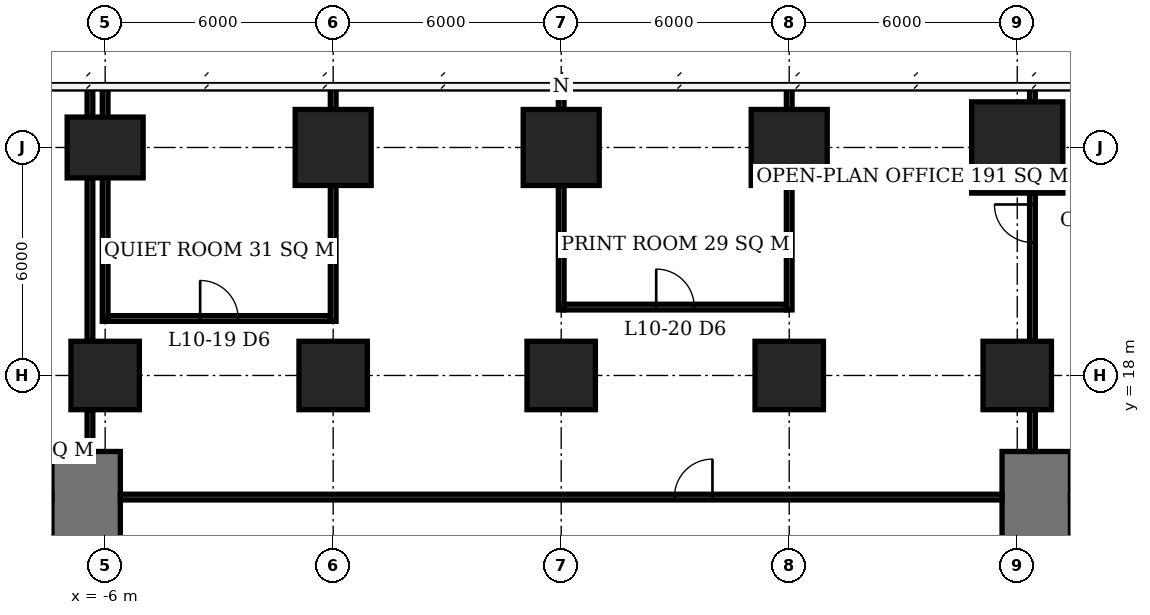
"""IFC4 building model, lengths in metres.
Left out: names, types, materials, properties, quantities, classifications, styles, units other than length and angle.
Written with IfcOpenShell. Run it as: python <this file> out.ifc"""

import sys

from ifc_helpers import new_model, si_unit, direction, frame, frame_2d, origin, origin_2d, place, context, subcontext, project, spatial, rectangle, extrude, element, fill, save


model = new_model("IFC4")
c1 = context("Model", 3, precision=1e-05, world=origin(), true_north=direction((0.0, 1.0)))
c2 = subcontext(c1, "Body", "Model", "MODEL_VIEW")
j1 = project(units=[si_unit("LENGTHUNIT", "METRE"), si_unit("PLANEANGLEUNIT", "RADIAN")], contexts=[c1])
p1 = place(None, origin())
s1 = spatial("IfcSite", under=j1, at=p1, CompositionType="ELEMENT")
p2 = place(p1, origin())
s2 = spatial("IfcBuilding", under=s1, at=p2, CompositionType="ELEMENT")
p3 = place(p2, frame((0.0, 0.0, 45.5)))
s3 = spatial("IfcBuildingStorey", under=s2, at=p3, CompositionType="ELEMENT", Elevation=45.5)
p4 = place(p3, frame((-6.0, 18.0, 0.0), z_axis=(0.0, 0.0, 1.0), x_axis=(1.0, 0.0, 0.0)))
e1 = element("IfcColumn", 1, at=p4, inside=s3, PredefinedType="COLUMN", context=c2, shape_type="SweptSolid", body=[
    extrude(rectangle(XDim=1.8, YDim=1.8, at=origin_2d()), origin(), (0.0, 0.0, 1.0), 3.9),
])
p5 = place(p3, frame((-6.0, 24.0, 0.0), z_axis=(0.0, 0.0, 1.0), x_axis=(1.0, 0.0, 0.0)))
e2 = element("IfcColumn", 2, at=p5, inside=s3, PredefinedType="COLUMN", context=c2, shape_type="SweptSolid", body=[
    extrude(rectangle(XDim=2.0, YDim=1.6, at=origin_2d()), origin(), (0.0, 0.0, 1.0), 3.9),
])
p6 = place(p3, frame((0.0, 18.0, 0.0), z_axis=(0.0, 0.0, 1.0), x_axis=(1.0, 0.0, 0.0)))
e3 = element("IfcColumn", 3, at=p6, inside=s3, PredefinedType="COLUMN", context=c2, shape_type="SweptSolid", body=[
    extrude(rectangle(XDim=1.8, YDim=1.8, at=origin_2d()), origin(), (0.0, 0.0, 1.0), 3.9),
])
p7 = place(p3, frame((0.0, 24.0, 0.0), z_axis=(0.0, 0.0, 1.0), x_axis=(1.0, 0.0, 0.0)))
e4 = element("IfcColumn", 4, at=p7, inside=s3, PredefinedType="COLUMN", context=c2, shape_type="SweptSolid", body=[
    extrude(rectangle(XDim=2.0, YDim=2.0, at=origin_2d()), origin(), (0.0, 0.0, 1.0), 3.9),
])
p8 = place(p3, frame((6.0, 18.0, 0.0), z_axis=(0.0, 0.0, 1.0), x_axis=(1.0, 0.0, 0.0)))
e5 = element("IfcColumn", 5, at=p8, inside=s3, PredefinedType="COLUMN", context=c2, shape_type="SweptSolid", body=[
    extrude(rectangle(XDim=1.8, YDim=1.8, at=origin_2d()), origin(), (0.0, 0.0, 1.0), 3.9),
])
p9 = place(p3, frame((6.0, 24.0, 0.0), z_axis=(0.0, 0.0, 1.0), x_axis=(1.0, 0.0, 0.0)))
e6 = element("IfcColumn", 6, at=p9, inside=s3, PredefinedType="COLUMN", context=c2, shape_type="SweptSolid", body=[
    extrude(rectangle(XDim=2.0, YDim=2.0, at=origin_2d()), origin(), (0.0, 0.0, 1.0), 3.9),
])
p10 = place(p3, frame((12.0, 18.0, 0.0), z_axis=(0.0, 0.0, 1.0), x_axis=(1.0, 0.0, 0.0)))
e7 = element("IfcColumn", 7, at=p10, inside=s3, PredefinedType="COLUMN", context=c2, shape_type="SweptSolid", body=[
    extrude(rectangle(XDim=1.8, YDim=1.8, at=origin_2d()), origin(), (0.0, 0.0, 1.0), 3.9),
])
p11 = place(p3, frame((12.0, 24.0, 0.0), z_axis=(0.0, 0.0, 1.0), x_axis=(1.0, 0.0, 0.0)))
e8 = element("IfcColumn", 8, at=p11, inside=s3, PredefinedType="COLUMN", context=c2, shape_type="SweptSolid", body=[
    extrude(rectangle(XDim=2.0, YDim=2.0, at=origin_2d()), origin(), (0.0, 0.0, 1.0), 3.9),
])
p12 = place(p3, frame((18.0, 18.0, 0.0), z_axis=(0.0, 0.0, 1.0), x_axis=(1.0, 0.0, 0.0)))
e9 = element("IfcColumn", 9, at=p12, inside=s3, PredefinedType="COLUMN", context=c2, shape_type="SweptSolid", body=[
    extrude(rectangle(XDim=1.8, YDim=1.8, at=origin_2d()), origin(), (0.0, 0.0, 1.0), 3.9),
])
p13 = place(p3, frame((18.0, 24.0, 0.0), z_axis=(0.0, 0.0, 1.0), x_axis=(1.0, 0.0, 0.0)))
e10 = element("IfcColumn", 10, at=p13, inside=s3, PredefinedType="COLUMN", context=c2, shape_type="SweptSolid", body=[
    extrude(rectangle(XDim=2.4, YDim=2.4, at=origin_2d()), origin(), (0.0, 0.0, 1.0), 3.9),
])
for number, where, z_axis, x_axis in (
    (11, (-6.5, 13.6, 0.0), (0.0, 0.0, 1.0), (0.0, 1.0, 0.0)),
    (12, (18.5, 13.6, 0.0), (0.0, 0.0, 1.0), (0.0, 1.0, 0.0)),
):
    element("IfcWall", number, at=place(p3, frame(where, z_axis=z_axis, x_axis=x_axis)), inside=s3, PredefinedType="SHEAR", context=c2, shape_type="SweptSolid", body=[
        extrude(rectangle(XDim=2.4, YDim=1.8, at=frame_2d((1.2, 0.0))), origin(), (0.0, 0.0, 1.0), 3.9),
    ])
p14 = place(p3, frame((-5.925, 19.5, 0.0), z_axis=(0.0, 0.0, 1.0), x_axis=(1.0, 0.0, 0.0)))
e13 = element("IfcWall", 13, at=p14, inside=s3, PredefinedType="PARTITIONING", context=c2, shape_type="SweptSolid", body=[
    extrude(rectangle(XDim=5.85, YDim=0.15, at=frame_2d((2.925, 0.0))), origin(), (0.0, 0.0, 1.0), 3.65),
])
p15 = place(p14, frame((2.425, 0.0, 0.0)))
e14 = element("IfcOpeningElement", 14, at=p15, cuts=e13, PredefinedType="OPENING", context=c2, shape_type="SweptSolid", body=[
    extrude(rectangle(XDim=1.0, YDim=2.1, at=frame_2d((0.5, 1.05))), frame((0.0, 0.085, 0.0), z_axis=(0.0, -1.0, 0.0), x_axis=(1.0, 0.0, 0.0)), (0.0, 0.0, 1.0), 0.17),
])
p16 = place(p3, frame((6.075, 19.8, 0.0), z_axis=(0.0, 0.0, 1.0), x_axis=(1.0, 0.0, 0.0)))
e15 = element("IfcWall", 15, at=p16, inside=s3, PredefinedType="PARTITIONING", context=c2, shape_type="SweptSolid", body=[
    extrude(rectangle(XDim=5.85, YDim=0.15, at=frame_2d((2.925, 0.0))), origin(), (0.0, 0.0, 1.0), 3.65),
])
p17 = place(p16, frame((2.425, 0.0, 0.0)))
e16 = element("IfcOpeningElement", 16, at=p17, cuts=e15, PredefinedType="OPENING", context=c2, shape_type="SweptSolid", body=[
    extrude(rectangle(XDim=1.0, YDim=2.1, at=frame_2d((0.5, 1.05))), frame((0.0, 0.085, 0.0), z_axis=(0.0, -1.0, 0.0), x_axis=(1.0, 0.0, 0.0)), (0.0, 0.0, 1.0), 0.17),
])
p18 = place(p3, frame((-6.0, 19.425, 0.0), z_axis=(0.0, 0.0, 1.0), x_axis=(0.0, 1.0, 0.0)))
e17 = element("IfcWall", 17, at=p18, inside=s3, PredefinedType="PARTITIONING", context=c2, shape_type="SweptSolid", body=[
    extrude(rectangle(XDim=3.775, YDim=0.15, at=frame_2d((1.887, 0.0))), origin(), (0.0, 0.0, 1.0), 3.65),
])
p19 = place(p3, frame((-6.0, 24.8, 0.0), z_axis=(0.0, 0.0, 1.0), x_axis=(0.0, 1.0, 0.0)))
e18 = element("IfcWall", 18, at=p19, inside=s3, PredefinedType="PARTITIONING", context=c2, shape_type="SweptSolid", body=[
    extrude(rectangle(XDim=0.8, YDim=0.15, at=frame_2d((0.4, 0.0))), origin(), (0.0, 0.0, 1.0), 3.65),
])
p20 = place(p3, frame((0.0, 19.425, 0.0), z_axis=(0.0, 0.0, 1.0), x_axis=(0.0, 1.0, 0.0)))
e19 = element("IfcWall", 19, at=p20, inside=s3, PredefinedType="PARTITIONING", context=c2, shape_type="SweptSolid", body=[
    extrude(rectangle(XDim=3.575, YDim=0.15, at=frame_2d((1.788, 0.0))), origin(), (0.0, 0.0, 1.0), 3.65),
])
p21 = place(p3, frame((0.0, 25.0, 0.0), z_axis=(0.0, 0.0, 1.0), x_axis=(0.0, 1.0, 0.0)))
e20 = element("IfcWall", 20, at=p21, inside=s3, PredefinedType="PARTITIONING", context=c2, shape_type="SweptSolid", body=[
    extrude(rectangle(XDim=0.6, YDim=0.15, at=frame_2d((0.3, 0.0))), origin(), (0.0, 0.0, 1.0), 3.65),
])
p22 = place(p3, frame((6.0, 19.725, 0.0), z_axis=(0.0, 0.0, 1.0), x_axis=(0.0, 1.0, 0.0)))
e21 = element("IfcWall", 21, at=p22, inside=s3, PredefinedType="PARTITIONING", context=c2, shape_type="SweptSolid", body=[
    extrude(rectangle(XDim=3.275, YDim=0.15, at=frame_2d((1.637, 0.0))), origin(), (0.0, 0.0, 1.0), 3.65),
])
p23 = place(p3, frame((6.0, 25.0, 0.0), z_axis=(0.0, 0.0, 1.0), x_axis=(0.0, 1.0, 0.0)))
e22 = element("IfcWall", 22, at=p23, inside=s3, PredefinedType="PARTITIONING", context=c2, shape_type="SweptSolid", body=[
    extrude(rectangle(XDim=0.55, YDim=0.15, at=frame_2d((0.275, 0.0))), origin(), (0.0, 0.0, 1.0), 3.65),
])
p24 = place(p3, frame((12.0, 19.725, 0.0), z_axis=(0.0, 0.0, 1.0), x_axis=(0.0, 1.0, 0.0)))
e23 = element("IfcWall", 23, at=p24, inside=s3, PredefinedType="PARTITIONING", context=c2, shape_type="SweptSolid", body=[
    extrude(rectangle(XDim=3.275, YDim=0.15, at=frame_2d((1.637, 0.0))), origin(), (0.0, 0.0, 1.0), 3.65),
])
p25 = place(p3, frame((12.0, 25.0, 0.0), z_axis=(0.0, 0.0, 1.0), x_axis=(0.0, 1.0, 0.0)))
e24 = element("IfcWall", 24, at=p25, inside=s3, PredefinedType="PARTITIONING", context=c2, shape_type="SweptSolid", body=[
    extrude(rectangle(XDim=0.6, YDim=0.15, at=frame_2d((0.3, 0.0))), origin(), (0.0, 0.0, 1.0), 3.65),
])
p26 = place(p3, frame((-6.4, 16.0, 0.0), z_axis=(0.0, 0.0, 1.0), x_axis=(0.0, 1.0, 0.0)))
e25 = element("IfcWall", 25, at=p26, inside=s3, PredefinedType="PARTITIONING", context=c2, shape_type="SweptSolid", body=[
    extrude(rectangle(XDim=1.1, YDim=0.15, at=frame_2d((0.55, 0.0))), origin(), (0.0, 0.0, 1.0), 3.65),
])
p27 = place(p3, frame((-6.4, 18.9, 0.0), z_axis=(0.0, 0.0, 1.0), x_axis=(0.0, 1.0, 0.0)))
e26 = element("IfcWall", 26, at=p27, inside=s3, PredefinedType="PARTITIONING", context=c2, shape_type="SweptSolid", body=[
    extrude(rectangle(XDim=4.3, YDim=0.15, at=frame_2d((2.15, 0.0))), origin(), (0.0, 0.0, 1.0), 3.65),
])
p28 = place(p3, frame((-6.4, 24.8, 0.0), z_axis=(0.0, 0.0, 1.0), x_axis=(0.0, 1.0, 0.0)))
e27 = element("IfcWall", 27, at=p28, inside=s3, PredefinedType="PARTITIONING", context=c2, shape_type="SweptSolid", body=[
    extrude(rectangle(XDim=0.75, YDim=0.15, at=frame_2d((0.375, 0.0))), origin(), (0.0, 0.0, 1.0), 3.65),
])
p29 = place(p3, frame((-5.6, 14.8, 0.0), z_axis=(0.0, 0.0, 1.0), x_axis=(1.0, 0.0, 0.0)))
e28 = element("IfcWall", 28, at=p29, inside=s3, PredefinedType="PARTITIONING", context=c2, shape_type="SweptSolid", body=[
    extrude(rectangle(XDim=23.2, YDim=0.15, at=frame_2d((11.6, 0.0))), origin(), (0.0, 0.0, 1.0), 3.65),
])
p30 = place(p29, frame((14.58, 0.0, 0.0)))
e29 = element("IfcOpeningElement", 29, at=p30, cuts=e28, PredefinedType="OPENING", context=c2, shape_type="SweptSolid", body=[
    extrude(rectangle(XDim=1.0, YDim=2.1, at=frame_2d((0.5, 1.05))), frame((0.0, 0.085, 0.0), z_axis=(0.0, -1.0, 0.0), x_axis=(1.0, 0.0, 0.0)), (0.0, 0.0, 1.0), 0.17),
])
p31 = place(p3, frame((18.4, 16.0, 0.0), z_axis=(0.0, 0.0, 1.0), x_axis=(0.0, 1.0, 0.0)))
e30 = element("IfcWall", 30, at=p31, inside=s3, PredefinedType="PARTITIONING", context=c2, shape_type="SweptSolid", body=[
    extrude(rectangle(XDim=1.1, YDim=0.15, at=frame_2d((0.55, 0.0))), origin(), (0.0, 0.0, 1.0), 3.65),
])
p32 = place(p3, frame((18.4, 18.9, 0.0), z_axis=(0.0, 0.0, 1.0), x_axis=(0.0, 1.0, 0.0)))
e31 = element("IfcWall", 31, at=p32, inside=s3, PredefinedType="PARTITIONING", context=c2, shape_type="SweptSolid", body=[
    extrude(rectangle(XDim=3.9, YDim=0.15, at=frame_2d((1.95, 0.0))), origin(), (0.0, 0.0, 1.0), 3.65),
])
p33 = place(p32, frame((2.6, 0.0, 0.0)))
e32 = element("IfcOpeningElement", 32, at=p33, cuts=e31, PredefinedType="OPENING", context=c2, shape_type="SweptSolid", body=[
    extrude(rectangle(XDim=1.0, YDim=2.1, at=frame_2d((0.5, 1.05))), frame((0.0, 0.085, 0.0), z_axis=(0.0, -1.0, 0.0), x_axis=(1.0, 0.0, 0.0)), (0.0, 0.0, 1.0), 0.17),
])
p34 = place(p3, frame((18.4, 25.2, 0.0), z_axis=(0.0, 0.0, 1.0), x_axis=(0.0, 1.0, 0.0)))
e33 = element("IfcWall", 33, at=p34, inside=s3, PredefinedType="PARTITIONING", context=c2, shape_type="SweptSolid", body=[
    extrude(rectangle(XDim=0.35, YDim=0.15, at=frame_2d((0.175, 0.0))), origin(), (0.0, 0.0, 1.0), 3.65),
])
p35 = place(p15, origin())
e34 = element("IfcDoor", 34, at=p35, inside=s3, OperationType="SINGLE_SWING_LEFT", PredefinedType="DOOR", context=c2, shape_type="SweptSolid", body=[
    extrude(rectangle(XDim=1.0, YDim=2.1, at=frame_2d((0.5, 1.05))), frame((0.0, 0.025, 0.0), z_axis=(0.0, -1.0, 0.0), x_axis=(1.0, 0.0, 0.0)), (0.0, 0.0, 1.0), 0.05),
])
fill(e14, e34)
p36 = place(p17, origin())
e35 = element("IfcDoor", 35, at=p36, inside=s3, OperationType="SINGLE_SWING_LEFT", PredefinedType="DOOR", context=c2, shape_type="SweptSolid", body=[
    extrude(rectangle(XDim=1.0, YDim=2.1, at=frame_2d((0.5, 1.05))), frame((0.0, 0.025, 0.0), z_axis=(0.0, -1.0, 0.0), x_axis=(1.0, 0.0, 0.0)), (0.0, 0.0, 1.0), 0.05),
])
fill(e16, e35)
p37 = place(p30, origin())
e36 = element("IfcDoor", 36, at=p37, inside=s3, OperationType="SINGLE_SWING_RIGHT", PredefinedType="DOOR", context=c2, shape_type="SweptSolid", body=[
    extrude(rectangle(XDim=1.0, YDim=2.1, at=frame_2d((0.5, 1.05))), frame((0.0, 0.025, 0.0), z_axis=(0.0, -1.0, 0.0), x_axis=(1.0, 0.0, 0.0)), (0.0, 0.0, 1.0), 0.05),
])
fill(e29, e36)
p38 = place(p33, origin())
e37 = element("IfcDoor", 37, at=p38, inside=s3, OperationType="SINGLE_SWING_RIGHT", PredefinedType="DOOR", context=c2, shape_type="SweptSolid", body=[
    extrude(rectangle(XDim=1.0, YDim=2.1, at=frame_2d((0.5, 1.05))), frame((0.0, 0.025, 0.0), z_axis=(0.0, -1.0, 0.0), x_axis=(1.0, 0.0, 0.0)), (0.0, 0.0, 1.0), 0.05),
])
fill(e32, e37)
save(model, sys.argv[1])
